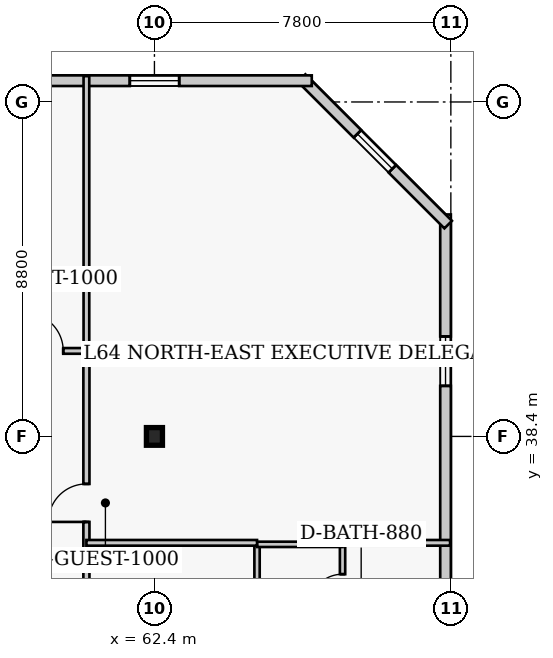
"""IFC4 building model, lengths in metres.
Left out: names, types, materials, properties, quantities, classifications, styles, units other than length and angle.
Written with IfcOpenShell. Run it as: python <this file> out.ifc"""

import sys

from ifc_helpers import new_model, si_unit, direction, frame, frame_2d, origin, origin_2d, place, context, subcontext, project, spatial, rectangle, i_section, extrude, element, fill, save


model = new_model("IFC4")
c1 = context("Model", 3, precision=1e-05, world=origin(), true_north=direction((0.0, 1.0)))
c2 = subcontext(c1, "Body", "Model", "MODEL_VIEW")
j1 = project(units=[si_unit("LENGTHUNIT", "METRE"), si_unit("PLANEANGLEUNIT", "RADIAN")], contexts=[c1])
p1 = place(None, origin())
s1 = spatial("IfcSite", under=j1, at=p1, CompositionType="ELEMENT")
p2 = place(p1, origin())
s2 = spatial("IfcBuilding", under=s1, at=p2, CompositionType="ELEMENT")
p3 = place(p2, frame((0.0, 0.0, 257.4)))
s3 = spatial("IfcBuildingStorey", under=s2, at=p3, CompositionType="ELEMENT", Elevation=257.4)
p4 = place(p3, frame((62.4, 38.4, 0.0), z_axis=(0.0, 0.0, 1.0), x_axis=(1.0, 0.0, 0.0)))
e1 = element("IfcColumn", 1, at=p4, inside=s3, PredefinedType="COLUMN", context=c2, shape_type="SweptSolid", body=[
    extrude(i_section(OverallWidth=0.422, OverallDepth=0.465, WebThickness=0.045, FlangeThickness=0.073, FilletRadius=0.017, at=origin_2d()), origin(), (0.0, 0.0, 1.0), 4.0),
])
p5 = place(p3, frame((70.06, 13.36, 0.0), z_axis=(0.0, 0.0, 1.0), x_axis=(0.0, 1.0, 0.0)))
e2 = element("IfcWall", 2, at=p5, inside=s3, PredefinedType="SOLIDWALL", context=c2, shape_type="SweptSolid", body=[
    extrude(rectangle(XDim=30.88, YDim=0.28, at=frame_2d((15.44, 0.0))), origin(), (0.0, 0.0, 1.0), 3.76),
])
p6 = place(p5, frame((3.21, 0.0, 0.85)))
e3 = element("IfcOpeningElement", 3, at=p6, cuts=e2, PredefinedType="OPENING", context=c2, shape_type="SweptSolid", body=[
    extrude(rectangle(XDim=1.3, YDim=1.7, at=frame_2d((0.65, 0.85))), frame((0.0, 0.15, 0.0), z_axis=(0.0, -1.0, 0.0), x_axis=(1.0, 0.0, 0.0)), (0.0, 0.0, 1.0), 0.3),
])
p7 = place(p5, frame((11.58, 0.0, 0.85)))
e4 = element("IfcOpeningElement", 4, at=p7, cuts=e2, PredefinedType="OPENING", context=c2, shape_type="SweptSolid", body=[
    extrude(rectangle(XDim=1.3, YDim=1.7, at=frame_2d((0.65, 0.85))), frame((0.0, 0.15, 0.0), z_axis=(0.0, -1.0, 0.0), x_axis=(1.0, 0.0, 0.0)), (0.0, 0.0, 1.0), 0.3),
])
p8 = place(p5, frame((18.65, 0.0, 0.85)))
e5 = element("IfcOpeningElement", 5, at=p8, cuts=e2, PredefinedType="OPENING", context=c2, shape_type="SweptSolid", body=[
    extrude(rectangle(XDim=1.3, YDim=1.7, at=frame_2d((0.65, 0.85))), frame((0.0, 0.15, 0.0), z_axis=(0.0, -1.0, 0.0), x_axis=(1.0, 0.0, 0.0)), (0.0, 0.0, 1.0), 0.3),
])
p9 = place(p5, frame((26.37, 0.0, 0.85)))
e6 = element("IfcOpeningElement", 6, at=p9, cuts=e2, PredefinedType="OPENING", context=c2, shape_type="SweptSolid", body=[
    extrude(rectangle(XDim=1.3, YDim=1.7, at=frame_2d((0.65, 0.85))), frame((0.0, 0.15, 0.0), z_axis=(0.0, -1.0, 0.0), x_axis=(1.0, 0.0, 0.0)), (0.0, 0.0, 1.0), 0.3),
])
p10 = place(p3, frame((70.129, 43.973, 0.0), z_axis=(0.0, 0.0, 1.0), x_axis=(-0.707106781187, 0.707106781187, 0.0)))
e7 = element("IfcWall", 7, at=p10, inside=s3, PredefinedType="SOLIDWALL", context=c2, shape_type="SweptSolid", body=[
    extrude(rectangle(XDim=5.454, YDim=0.28, at=frame_2d((2.727, 0.0))), origin(), (0.0, 0.0, 1.0), 3.76),
])
p11 = place(p10, frame((2.077, 0.0, 0.85)))
e8 = element("IfcOpeningElement", 8, at=p11, cuts=e7, PredefinedType="OPENING", context=c2, shape_type="SweptSolid", body=[
    extrude(rectangle(XDim=1.3, YDim=1.7, at=frame_2d((0.65, 0.85))), frame((0.0, 0.15, 0.0), z_axis=(0.0, -1.0, 0.0), x_axis=(1.0, 0.0, 0.0)), (0.0, 0.0, 1.0), 0.3),
])
p12 = place(p3, frame((66.54, 47.76, 0.0), z_axis=(0.0, 0.0, 1.0), x_axis=(-1.0, 0.0, 0.0)))
e9 = element("IfcWall", 9, at=p12, inside=s3, PredefinedType="SOLIDWALL", context=c2, shape_type="SweptSolid", body=[
    extrude(rectangle(XDim=24.83, YDim=0.28, at=frame_2d((12.415, 0.0))), origin(), (0.0, 0.0, 1.0), 3.76),
])
p13 = place(p12, frame((15.14, 0.0, 0.0)))
e10 = element("IfcOpeningElement", 10, at=p13, cuts=e9, PredefinedType="OPENING", context=c2, shape_type="SweptSolid", body=[
    extrude(rectangle(XDim=1.4, YDim=2.15, at=frame_2d((0.7, 1.075))), frame((0.0, 0.15, 0.0), z_axis=(0.0, -1.0, 0.0), x_axis=(1.0, 0.0, 0.0)), (0.0, 0.0, 1.0), 0.3),
])
p14 = place(p12, frame((3.488, 0.0, 0.85)))
e11 = element("IfcOpeningElement", 11, at=p14, cuts=e9, PredefinedType="OPENING", context=c2, shape_type="SweptSolid", body=[
    extrude(rectangle(XDim=1.3, YDim=1.7, at=frame_2d((0.65, 0.85))), frame((0.0, 0.15, 0.0), z_axis=(0.0, -1.0, 0.0), x_axis=(1.0, 0.0, 0.0)), (0.0, 0.0, 1.0), 0.3),
])
p15 = place(p12, frame((12.915, 0.0, 0.85)))
e12 = element("IfcOpeningElement", 12, at=p15, cuts=e9, PredefinedType="OPENING", context=c2, shape_type="SweptSolid", body=[
    extrude(rectangle(XDim=1.3, YDim=1.7, at=frame_2d((0.65, 0.85))), frame((0.0, 0.15, 0.0), z_axis=(0.0, -1.0, 0.0), x_axis=(1.0, 0.0, 0.0)), (0.0, 0.0, 1.0), 0.3),
])
p16 = place(p12, frame((20.692, 0.0, 0.85)))
e13 = element("IfcOpeningElement", 13, at=p16, cuts=e9, PredefinedType="OPENING", context=c2, shape_type="SweptSolid", body=[
    extrude(rectangle(XDim=1.3, YDim=1.7, at=frame_2d((0.65, 0.85))), frame((0.0, 0.15, 0.0), z_axis=(0.0, -1.0, 0.0), x_axis=(1.0, 0.0, 0.0)), (0.0, 0.0, 1.0), 0.3),
])
p17 = place(p3, frame((60.61, 24.25, 0.0), z_axis=(0.0, 0.0, 1.0), x_axis=(0.0, 1.0, 0.0)))
e14 = element("IfcWall", 14, at=p17, inside=s3, PredefinedType="PARTITIONING", context=c2, shape_type="SweptSolid", body=[
    extrude(rectangle(XDim=16.4, YDim=0.16, at=frame_2d((8.2, 0.0))), origin(), (0.0, 0.0, 1.0), 3.76),
])
p18 = place(p17, frame((0.46, 0.0, 0.0)))
e15 = element("IfcOpeningElement", 15, at=p18, cuts=e14, PredefinedType="OPENING", context=c2, shape_type="SweptSolid", body=[
    extrude(rectangle(XDim=0.95, YDim=2.1, at=frame_2d((0.475, 1.05))), frame((0.0, 0.09, 0.0), z_axis=(0.0, -1.0, 0.0), x_axis=(1.0, 0.0, 0.0)), (0.0, 0.0, 1.0), 0.18),
])
p19 = place(p17, frame((11.9, 0.0, 0.0)))
e16 = element("IfcOpeningElement", 16, at=p19, cuts=e14, PredefinedType="OPENING", context=c2, shape_type="SweptSolid", body=[
    extrude(rectangle(XDim=1.0, YDim=2.15, at=frame_2d((0.5, 1.075))), frame((0.0, 0.09, 0.0), z_axis=(0.0, -1.0, 0.0), x_axis=(1.0, 0.0, 0.0)), (0.0, 0.0, 1.0), 0.18),
])
p20 = place(p3, frame((56.8, 40.65, 0.0), z_axis=(0.0, 0.0, 1.0), x_axis=(1.0, 0.0, 0.0)))
e17 = element("IfcWall", 17, at=p20, inside=s3, PredefinedType="PARTITIONING", context=c2, shape_type="SweptSolid", body=[
    extrude(rectangle(XDim=3.81, YDim=0.15, at=frame_2d((1.905, 0.0))), origin(), (0.0, 0.0, 1.0), 3.76),
])
p21 = place(p20, frame((2.2, 0.0, 0.0)))
e18 = element("IfcOpeningElement", 18, at=p21, cuts=e17, PredefinedType="OPENING", context=c2, shape_type="SweptSolid", body=[
    extrude(rectangle(XDim=1.0, YDim=2.15, at=frame_2d((0.5, 1.075))), frame((0.0, 0.085, 0.0), z_axis=(0.0, -1.0, 0.0), x_axis=(1.0, 0.0, 0.0)), (0.0, 0.0, 1.0), 0.17),
])
p22 = place(p3, frame((60.61, 40.65, 0.0), z_axis=(0.0, 0.0, 1.0), x_axis=(0.0, 1.0, 0.0)))
e19 = element("IfcWall", 19, at=p22, inside=s3, PredefinedType="PARTITIONING", context=c2, shape_type="SweptSolid", body=[
    extrude(rectangle(XDim=7.23, YDim=0.15, at=frame_2d((3.615, 0.0))), origin(), (0.0, 0.0, 1.0), 3.76),
])
p23 = place(p3, frame((65.1, 33.11, 0.0), z_axis=(0.0, 0.0, 1.0), x_axis=(0.0, 1.0, 0.0)))
e20 = element("IfcWall", 20, at=p23, inside=s3, PredefinedType="PLUMBINGWALL", context=c2, shape_type="SweptSolid", body=[
    extrude(rectangle(XDim=2.45, YDim=0.14, at=frame_2d((1.225, 0.0))), origin(), (0.0, 0.0, 1.0), 3.76),
])
p24 = place(p3, frame((67.35, 33.11, 0.0), z_axis=(0.0, 0.0, 1.0), x_axis=(0.0, 1.0, 0.0)))
e21 = element("IfcWall", 21, at=p24, inside=s3, PredefinedType="PLUMBINGWALL", context=c2, shape_type="SweptSolid", body=[
    extrude(rectangle(XDim=2.45, YDim=0.14, at=frame_2d((1.225, 0.0))), origin(), (0.0, 0.0, 1.0), 3.76),
])
p25 = place(p24, frame((0.785, 0.0, 0.0)))
e22 = element("IfcOpeningElement", 22, at=p25, cuts=e21, PredefinedType="OPENING", context=c2, shape_type="SweptSolid", body=[
    extrude(rectangle(XDim=0.88, YDim=2.05, at=frame_2d((0.44, 1.025))), frame((0.0, 0.08, 0.0), z_axis=(0.0, -1.0, 0.0), x_axis=(1.0, 0.0, 0.0)), (0.0, 0.0, 1.0), 0.16),
])
p26 = place(p3, frame((65.1, 35.56, 0.0), z_axis=(0.0, 0.0, 1.0), x_axis=(1.0, 0.0, 0.0)))
e23 = element("IfcWall", 23, at=p26, inside=s3, PredefinedType="PLUMBINGWALL", context=c2, shape_type="SweptSolid", body=[
    extrude(rectangle(XDim=2.25, YDim=0.14, at=frame_2d((1.125, 0.0))), origin(), (0.0, 0.0, 1.0), 3.76),
])
p27 = place(p3, frame((60.61, 35.6, 0.0), z_axis=(0.0, 0.0, 1.0), x_axis=(1.0, 0.0, 0.0)))
e24 = element("IfcWall", 24, at=p27, inside=s3, PredefinedType="PARTITIONING", context=c2, shape_type="SweptSolid", body=[
    extrude(rectangle(XDim=4.49, YDim=0.15, at=frame_2d((2.245, 0.0))), origin(), (0.0, 0.0, 1.0), 3.76),
])
p28 = place(p3, frame((67.35, 35.6, 0.0), z_axis=(0.0, 0.0, 1.0), x_axis=(1.0, 0.0, 0.0)))
e25 = element("IfcWall", 25, at=p28, inside=s3, PredefinedType="PARTITIONING", context=c2, shape_type="SweptSolid", body=[
    extrude(rectangle(XDim=2.83, YDim=0.15, at=frame_2d((1.415, 0.0))), origin(), (0.0, 0.0, 1.0), 3.76),
])
p29 = place(p9, origin())
e26 = element("IfcWindow", 26, at=p29, inside=s3, PartitioningType="SINGLE_PANEL", PredefinedType="WINDOW", context=c2, shape_type="SweptSolid", body=[
    extrude(rectangle(XDim=1.3, YDim=1.7, at=frame_2d((0.65, 0.85))), frame((0.0, 0.03, 0.0), z_axis=(0.0, -1.0, 0.0), x_axis=(1.0, 0.0, 0.0)), (0.0, 0.0, 1.0), 0.06),
])
fill(e6, e26)
p30 = place(p11, origin())
e27 = element("IfcWindow", 27, at=p30, inside=s3, PartitioningType="SINGLE_PANEL", PredefinedType="WINDOW", context=c2, shape_type="SweptSolid", body=[
    extrude(rectangle(XDim=1.3, YDim=1.7, at=frame_2d((0.65, 0.85))), frame((0.0, 0.03, 0.0), z_axis=(0.0, -1.0, 0.0), x_axis=(1.0, 0.0, 0.0)), (0.0, 0.0, 1.0), 0.06),
])
fill(e8, e27)
p31 = place(p14, origin())
e28 = element("IfcWindow", 28, at=p31, inside=s3, PartitioningType="SINGLE_PANEL", PredefinedType="WINDOW", context=c2, shape_type="SweptSolid", body=[
    extrude(rectangle(XDim=1.3, YDim=1.7, at=frame_2d((0.65, 0.85))), frame((0.0, 0.03, 0.0), z_axis=(0.0, -1.0, 0.0), x_axis=(1.0, 0.0, 0.0)), (0.0, 0.0, 1.0), 0.06),
])
fill(e11, e28)
p32 = place(p21, origin())
e29 = element("IfcDoor", 29, at=p32, inside=s3, OperationType="SINGLE_SWING_LEFT", PredefinedType="DOOR", context=c2, shape_type="SweptSolid", body=[
    extrude(rectangle(XDim=1.0, YDim=2.15, at=frame_2d((0.5, 1.075))), frame((0.0, 0.025, 0.0), z_axis=(0.0, -1.0, 0.0), x_axis=(1.0, 0.0, 0.0)), (0.0, 0.0, 1.0), 0.05),
])
fill(e18, e29)
p33 = place(p25, origin())
e30 = element("IfcDoor", 30, at=p33, inside=s3, OperationType="SINGLE_SWING_LEFT", PredefinedType="DOOR", context=c2, shape_type="SweptSolid", body=[
    extrude(rectangle(XDim=0.88, YDim=2.05, at=frame_2d((0.44, 1.025))), frame((0.0, 0.025, 0.0), z_axis=(0.0, -1.0, 0.0), x_axis=(1.0, 0.0, 0.0)), (0.0, 0.0, 1.0), 0.05),
])
fill(e22, e30)
p34 = place(p19, origin())
e31 = element("IfcDoor", 31, at=p34, inside=s3, OperationType="SINGLE_SWING_LEFT", PredefinedType="DOOR", context=c2, shape_type="SweptSolid", body=[
    extrude(rectangle(XDim=1.0, YDim=2.15, at=frame_2d((0.5, 1.075))), frame((0.0, 0.025, 0.0), z_axis=(0.0, -1.0, 0.0), x_axis=(1.0, 0.0, 0.0)), (0.0, 0.0, 1.0), 0.05),
])
fill(e16, e31)
save(model, sys.argv[1])
